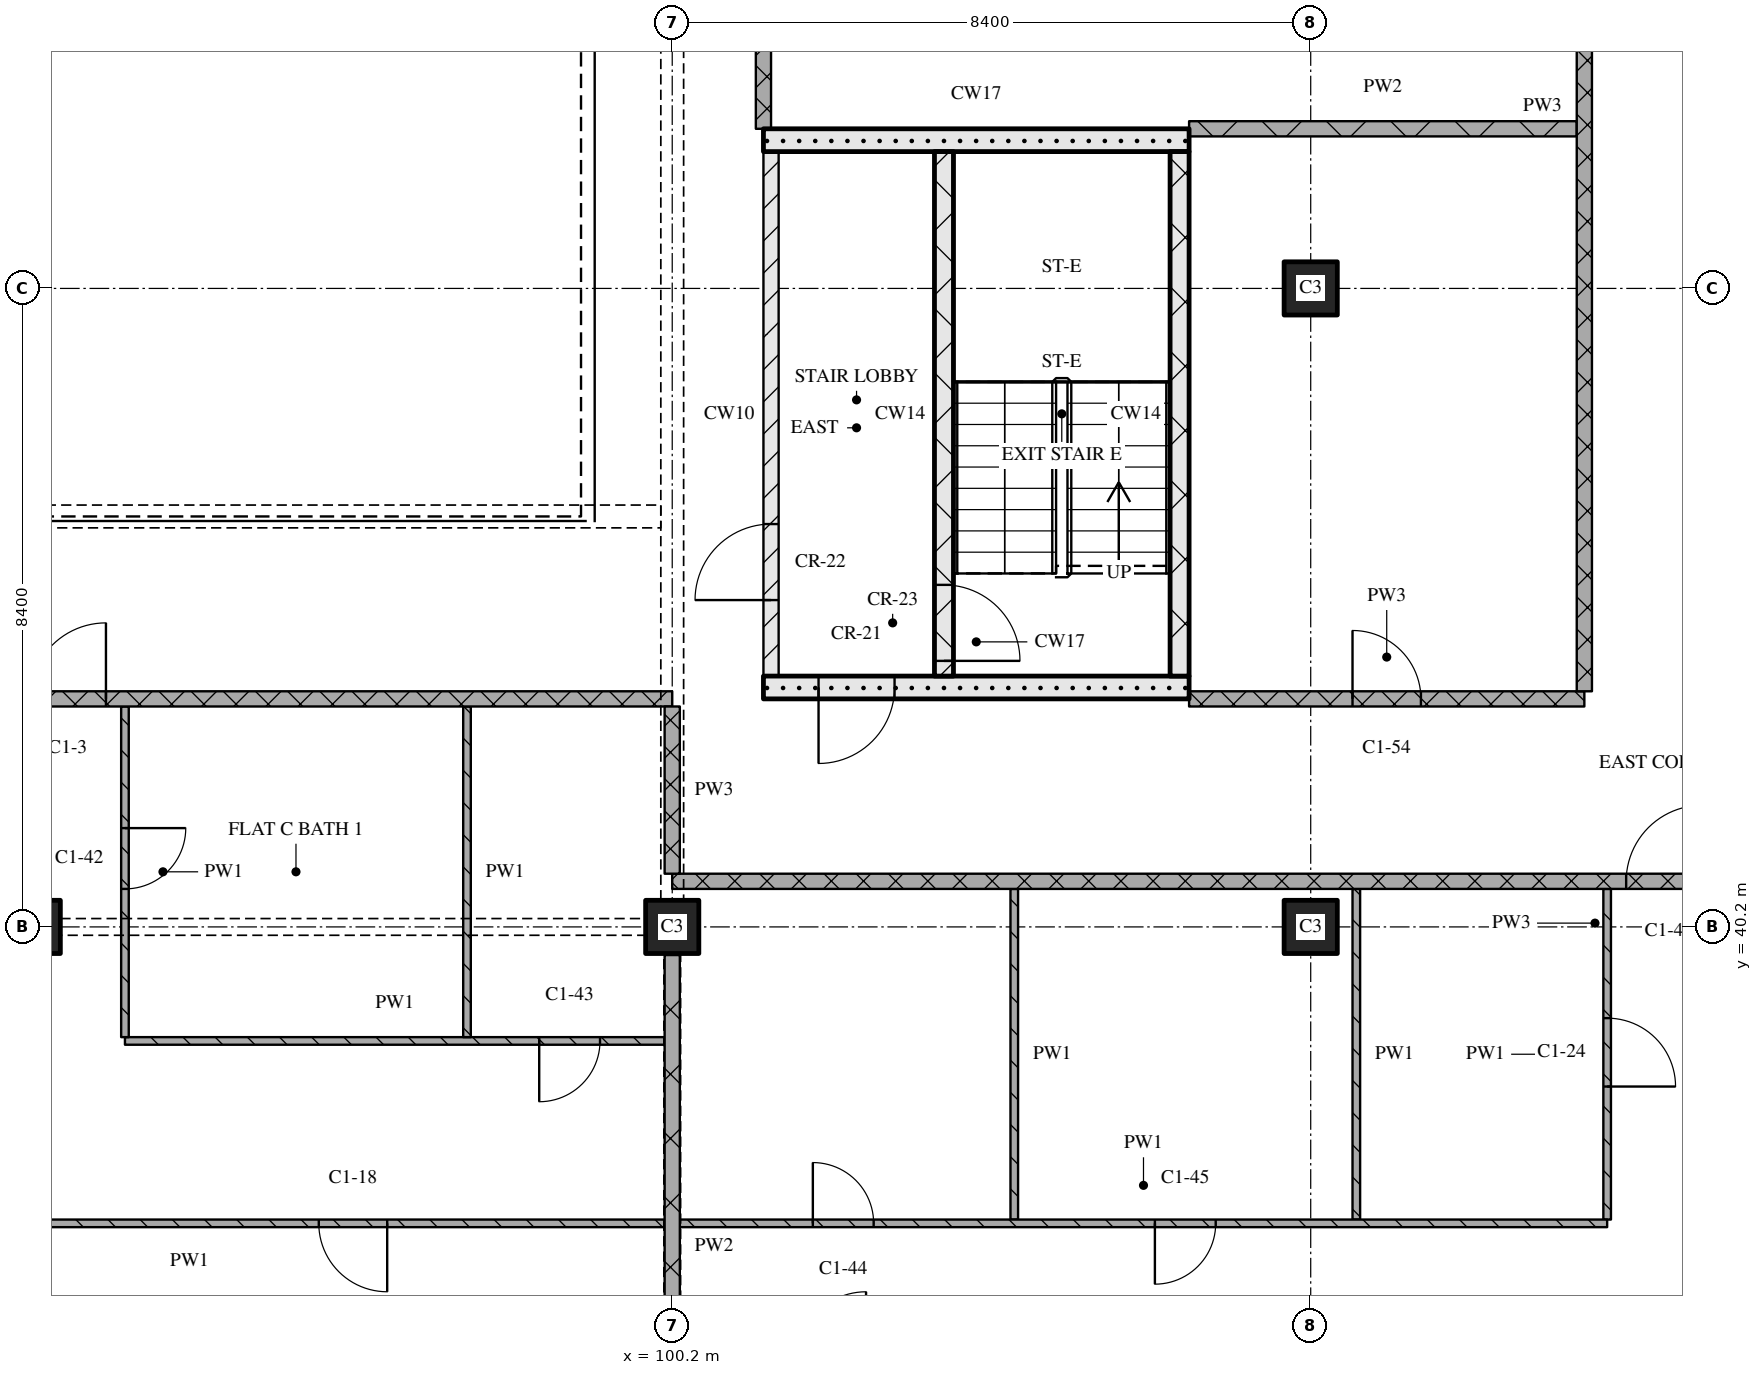
"""IFC4 building model, lengths in metres.
Left out: names, types, materials, properties, quantities, classifications, styles, units other than length and angle.
Written with IfcOpenShell. Run it as: python <this file> out.ifc"""

import sys

from ifc_helpers import new_model, si_unit, direction, frame, frame_2d, origin, origin_2d, place, context, subcontext, project, spatial, rectangle, extrude, element, fill, save


model = new_model("IFC4")
c1 = context("Model", 3, precision=1e-05, world=origin(), true_north=direction((0.0, 1.0)))
c2 = subcontext(c1, "Body", "Model", "MODEL_VIEW")
j1 = project(units=[si_unit("LENGTHUNIT", "METRE"), si_unit("PLANEANGLEUNIT", "RADIAN")], contexts=[c1])
p1 = place(None, origin())
s1 = spatial("IfcSite", under=j1, at=p1, CompositionType="ELEMENT")
p2 = place(p1, origin())
s2 = spatial("IfcBuilding", under=s1, at=p2, CompositionType="ELEMENT")
p3 = place(p2, frame((0.0, 0.0, 151.05)))
s3 = spatial("IfcBuildingStorey", under=s2, at=p3, CompositionType="ELEMENT", Elevation=151.05)
for number, where, z_axis, x_axis in (
    (1, (91.8, 40.2, 0.0), (0.0, 0.0, 1.0), (1.0, 0.0, 0.0)),
    (2, (100.2, 40.2, 0.0), (0.0, 0.0, 1.0), (1.0, 0.0, 0.0)),
    (3, (108.6, 40.2, 0.0), (0.0, 0.0, 1.0), (1.0, 0.0, 0.0)),
    (4, (108.6, 48.6, 0.0), (0.0, 0.0, 1.0), (1.0, 0.0, 0.0)),
):
    element("IfcColumn", number, at=place(p3, frame(where, z_axis=z_axis, x_axis=x_axis)), inside=s3, PredefinedType="COLUMN", context=c2, shape_type="SweptSolid", body=[
        extrude(rectangle(XDim=0.7, YDim=0.7, at=origin_2d()), origin(), (0.0, 0.0, 1.0), 3.6),
    ])
p4 = place(p3, frame((101.4, 43.35, 0.0), z_axis=(0.0, 0.0, 1.0), x_axis=(1.0, 0.0, 0.0)))
e5 = element("IfcWall", 5, at=p4, inside=s3, PredefinedType="SOLIDWALL", context=c2, shape_type="SweptSolid", body=[
    extrude(rectangle(XDim=5.6, YDim=0.3, at=frame_2d((2.8, 0.0))), origin(), (0.0, 0.0, 1.0), 3.32),
])
p5 = place(p4, frame((0.725, 0.0, 0.0)))
e6 = element("IfcOpeningElement", 6, at=p5, cuts=e5, PredefinedType="OPENING", context=c2, shape_type="SweptSolid", body=[
    extrude(rectangle(XDim=1.0, YDim=2.1, at=frame_2d((0.5, 1.05))), frame((0.0, 0.16, 0.0), z_axis=(0.0, -1.0, 0.0), x_axis=(1.0, 0.0, 0.0)), (0.0, 0.0, 1.0), 0.32),
])
p6 = place(p3, frame((101.5, 43.5, 0.0), z_axis=(0.0, 0.0, 1.0), x_axis=(0.0, 1.0, 0.0)))
e7 = element("IfcWall", 7, at=p6, inside=s3, PredefinedType="PARTITIONING", context=c2, shape_type="SweptSolid", body=[
    extrude(rectangle(XDim=6.9, YDim=0.2, at=frame_2d((3.45, 0.0))), origin(), (0.0, 0.0, 1.0), 3.32),
])
p7 = place(p6, frame((1.0, 0.0, 0.0)))
e8 = element("IfcOpeningElement", 8, at=p7, cuts=e7, PredefinedType="OPENING", context=c2, shape_type="SweptSolid", body=[
    extrude(rectangle(XDim=1.0, YDim=2.1, at=frame_2d((0.5, 1.05))), frame((0.0, 0.11, 0.0), z_axis=(0.0, -1.0, 0.0), x_axis=(1.0, 0.0, 0.0)), (0.0, 0.0, 1.0), 0.22),
])
p8 = place(p3, frame((103.775, 43.5, 0.0), z_axis=(0.0, 0.0, 1.0), x_axis=(0.0, 1.0, 0.0)))
e9 = element("IfcWall", 9, at=p8, inside=s3, PredefinedType="SOLIDWALL", context=c2, shape_type="SweptSolid", body=[
    extrude(rectangle(XDim=6.9, YDim=0.25, at=frame_2d((3.45, 0.0))), origin(), (0.0, 0.0, 1.0), 3.32),
])
p9 = place(p8, frame((0.2, 0.0, 0.0)))
e10 = element("IfcOpeningElement", 10, at=p9, cuts=e9, PredefinedType="OPENING", context=c2, shape_type="SweptSolid", body=[
    extrude(rectangle(XDim=1.0, YDim=2.1, at=frame_2d((0.5, 1.05))), frame((0.0, 0.135, 0.0), z_axis=(0.0, -1.0, 0.0), x_axis=(1.0, 0.0, 0.0)), (0.0, 0.0, 1.0), 0.27),
])
p10 = place(p3, frame((106.875, 43.5, 0.0), z_axis=(0.0, 0.0, 1.0), x_axis=(0.0, 1.0, 0.0)))
e11 = element("IfcWall", 11, at=p10, inside=s3, PredefinedType="SOLIDWALL", context=c2, shape_type="SweptSolid", body=[
    extrude(rectangle(XDim=6.9, YDim=0.25, at=frame_2d((3.45, 0.0))), origin(), (0.0, 0.0, 1.0), 3.32),
])
p11 = place(p3, frame((101.4, 50.55, 0.0), z_axis=(0.0, 0.0, 1.0), x_axis=(1.0, 0.0, 0.0)))
e12 = element("IfcWall", 12, at=p11, inside=s3, PredefinedType="SOLIDWALL", context=c2, shape_type="SweptSolid", body=[
    extrude(rectangle(XDim=5.6, YDim=0.3, at=frame_2d((2.8, 0.0))), origin(), (0.0, 0.0, 1.0), 3.32),
])
p12 = place(p3, frame((93.0, 38.7, 0.0), z_axis=(0.0, 0.0, 1.0), x_axis=(1.0, 0.0, 0.0)))
e13 = element("IfcWall", 13, at=p12, inside=s3, PredefinedType="PARTITIONING", context=c2, shape_type="SweptSolid", body=[
    extrude(rectangle(XDim=7.1, YDim=0.1, at=frame_2d((3.55, 0.0))), origin(), (0.0, 0.0, 1.0), 3.32),
])
p13 = place(p12, frame((5.45, 0.0, 0.0)))
e14 = element("IfcOpeningElement", 14, at=p13, cuts=e13, PredefinedType="OPENING", context=c2, shape_type="SweptSolid", body=[
    extrude(rectangle(XDim=0.8, YDim=2.1, at=frame_2d((0.4, 1.05))), frame((0.0, 0.06, 0.0), z_axis=(0.0, -1.0, 0.0), x_axis=(1.0, 0.0, 0.0)), (0.0, 0.0, 1.0), 0.12),
])
p14 = place(p3, frame((124.48, 40.8, 0.0), z_axis=(0.0, 0.0, 1.0), x_axis=(-1.0, 0.0, 0.0)))
e15 = element("IfcWall", 15, at=p14, inside=s3, PredefinedType="PARTITIONING", context=c2, shape_type="SweptSolid", body=[
    extrude(rectangle(XDim=24.28, YDim=0.2, at=frame_2d((12.14, 0.0))), origin(), (0.0, 0.0, 1.0), 3.32),
])
p15 = place(p14, frame((10.73, 0.0, 0.0)))
e16 = element("IfcOpeningElement", 16, at=p15, cuts=e15, PredefinedType="OPENING", context=c2, shape_type="SweptSolid", body=[
    extrude(rectangle(XDim=1.0, YDim=2.1, at=frame_2d((0.5, 1.05))), frame((0.0, 0.11, 0.0), z_axis=(0.0, -1.0, 0.0), x_axis=(1.0, 0.0, 0.0)), (0.0, 0.0, 1.0), 0.22),
])
p16 = place(p3, frame((100.2, 43.2, 0.0), z_axis=(0.0, 0.0, 1.0), x_axis=(-1.0, 0.0, 0.0)))
e17 = element("IfcWall", 17, at=p16, inside=s3, PredefinedType="PARTITIONING", context=c2, shape_type="SweptSolid", body=[
    extrude(rectangle(XDim=25.2, YDim=0.2, at=frame_2d((12.6, 0.0))), origin(), (0.0, 0.0, 1.0), 3.32),
])
p17 = place(p16, frame((7.45, 0.0, 0.0)))
e18 = element("IfcOpeningElement", 18, at=p17, cuts=e17, PredefinedType="OPENING", context=c2, shape_type="SweptSolid", body=[
    extrude(rectangle(XDim=1.0, YDim=2.1, at=frame_2d((0.5, 1.05))), frame((0.0, 0.11, 0.0), z_axis=(0.0, -1.0, 0.0), x_axis=(1.0, 0.0, 0.0)), (0.0, 0.0, 1.0), 0.22),
])
p18 = place(p16, frame((20.95, 0.0, 0.0)))
e19 = element("IfcOpeningElement", 19, at=p18, cuts=e17, PredefinedType="OPENING", context=c2, shape_type="SweptSolid", body=[
    extrude(rectangle(XDim=1.0, YDim=2.1, at=frame_2d((0.5, 1.05))), frame((0.0, 0.11, 0.0), z_axis=(0.0, -1.0, 0.0), x_axis=(1.0, 0.0, 0.0)), (0.0, 0.0, 1.0), 0.22),
])
p19 = place(p3, frame((107.0, 43.2, 0.0), z_axis=(0.0, 0.0, 1.0), x_axis=(1.0, 0.0, 0.0)))
e20 = element("IfcWall", 20, at=p19, inside=s3, PredefinedType="PARTITIONING", context=c2, shape_type="SweptSolid", body=[
    extrude(rectangle(XDim=5.2, YDim=0.2, at=frame_2d((2.6, 0.0))), origin(), (0.0, 0.0, 1.0), 3.32),
])
p20 = place(p19, frame((2.15, 0.0, 0.0)))
e21 = element("IfcOpeningElement", 21, at=p20, cuts=e20, PredefinedType="OPENING", context=c2, shape_type="SweptSolid", body=[
    extrude(rectangle(XDim=0.9, YDim=2.1, at=frame_2d((0.45, 1.05))), frame((0.0, 0.11, 0.0), z_axis=(0.0, -1.0, 0.0), x_axis=(1.0, 0.0, 0.0)), (0.0, 0.0, 1.0), 0.22),
])
p21 = place(p3, frame((107.0, 50.7, 0.0), z_axis=(0.0, 0.0, 1.0), x_axis=(1.0, 0.0, 0.0)))
e22 = element("IfcWall", 22, at=p21, inside=s3, PredefinedType="PARTITIONING", context=c2, shape_type="SweptSolid", body=[
    extrude(rectangle(XDim=5.1, YDim=0.2, at=frame_2d((2.55, 0.0))), origin(), (0.0, 0.0, 1.0), 3.32),
])
p22 = place(p3, frame((93.0, 43.1, 0.0), z_axis=(0.0, 0.0, 1.0), x_axis=(0.0, -1.0, 0.0)))
e23 = element("IfcWall", 23, at=p22, inside=s3, PredefinedType="PARTITIONING", context=c2, shape_type="SweptSolid", body=[
    extrude(rectangle(XDim=4.35, YDim=0.1, at=frame_2d((2.175, 0.0))), origin(), (0.0, 0.0, 1.0), 3.32),
])
p23 = place(p22, frame((1.6, 0.0, 0.0)))
e24 = element("IfcOpeningElement", 24, at=p23, cuts=e23, PredefinedType="OPENING", context=c2, shape_type="SweptSolid", body=[
    extrude(rectangle(XDim=0.8, YDim=2.1, at=frame_2d((0.4, 1.05))), frame((0.0, 0.06, 0.0), z_axis=(0.0, -1.0, 0.0), x_axis=(1.0, 0.0, 0.0)), (0.0, 0.0, 1.0), 0.12),
])
p24 = place(p3, frame((97.5, 43.1, 0.0), z_axis=(0.0, 0.0, 1.0), x_axis=(0.0, -1.0, 0.0)))
e25 = element("IfcWall", 25, at=p24, inside=s3, PredefinedType="PARTITIONING", context=c2, shape_type="SweptSolid", body=[
    extrude(rectangle(XDim=4.35, YDim=0.1, at=frame_2d((2.175, 0.0))), origin(), (0.0, 0.0, 1.0), 3.32),
])
p25 = place(p3, frame((100.2, 43.1, 0.0), z_axis=(0.0, 0.0, 1.0), x_axis=(0.0, -1.0, 0.0)))
e26 = element("IfcWall", 26, at=p25, inside=s3, PredefinedType="PARTITIONING", context=c2, shape_type="SweptSolid", body=[
    extrude(rectangle(XDim=2.2, YDim=0.2, at=frame_2d((1.1, 0.0))), origin(), (0.0, 0.0, 1.0), 2.43),
])
p26 = place(p3, frame((100.2, 39.83, 0.0), z_axis=(0.0, 0.0, 1.0), x_axis=(0.0, -1.0, 0.0)))
e27 = element("IfcWall", 27, at=p26, inside=s3, PredefinedType="PARTITIONING", context=c2, shape_type="SweptSolid", body=[
    extrude(rectangle(XDim=7.66, YDim=0.2, at=frame_2d((3.83, 0.0))), origin(), (0.0, 0.0, 1.0), 2.72),
])
p27 = place(p3, frame((101.4, 58.7, 0.0), z_axis=(0.0, 0.0, 1.0), x_axis=(0.0, -1.0, 0.0)))
e28 = element("IfcWall", 28, at=p27, inside=s3, PredefinedType="PARTITIONING", context=c2, shape_type="SweptSolid", body=[
    extrude(rectangle(XDim=8.0, YDim=0.2, at=frame_2d((4.0, 0.0))), origin(), (0.0, 0.0, 1.0), 3.32),
])
p28 = place(p27, frame((1.225, 0.0, 0.9)))
e29 = element("IfcOpeningElement", 29, at=p28, cuts=e28, PredefinedType="OPENING", context=c2, shape_type="SweptSolid", body=[
    extrude(rectangle(XDim=1.5, YDim=1.5, at=frame_2d((0.75, 0.75))), frame((0.0, 0.11, 0.0), z_axis=(0.0, -1.0, 0.0), x_axis=(1.0, 0.0, 0.0)), (0.0, 0.0, 1.0), 0.22),
])
for number, where, z_axis, x_axis in (
    (30, (104.7, 40.7, 0.0), (0.0, 0.0, 1.0), (0.0, -1.0, 0.0)),
    (31, (109.2, 40.7, 0.0), (0.0, 0.0, 1.0), (0.0, -1.0, 0.0)),
):
    element("IfcWall", number, at=place(p3, frame(where, z_axis=z_axis, x_axis=x_axis)), inside=s3, PredefinedType="PARTITIONING", context=c2, shape_type="SweptSolid", body=[
        extrude(rectangle(XDim=4.35, YDim=0.1, at=frame_2d((2.175, 0.0))), origin(), (0.0, 0.0, 1.0), 3.32),
    ])
p29 = place(p3, frame((112.2, 43.3, 0.0), z_axis=(0.0, 0.0, 1.0), x_axis=(0.0, 1.0, 0.0)))
e32 = element("IfcWall", 32, at=p29, inside=s3, PredefinedType="PARTITIONING", context=c2, shape_type="SweptSolid", body=[
    extrude(rectangle(XDim=15.4, YDim=0.2, at=frame_2d((7.7, 0.0))), origin(), (0.0, 0.0, 1.0), 3.32),
])
p30 = place(p29, frame((11.85, 0.0, 0.0)))
e33 = element("IfcOpeningElement", 33, at=p30, cuts=e32, PredefinedType="OPENING", context=c2, shape_type="SweptSolid", body=[
    extrude(rectangle(XDim=1.0, YDim=2.1, at=frame_2d((0.5, 1.05))), frame((0.0, 0.11, 0.0), z_axis=(0.0, -1.0, 0.0), x_axis=(1.0, 0.0, 0.0)), (0.0, 0.0, 1.0), 0.22),
])
p31 = place(p3, frame((112.5, 36.35, 0.0), z_axis=(0.0, 0.0, 1.0), x_axis=(0.0, 1.0, 0.0)))
e34 = element("IfcWall", 34, at=p31, inside=s3, PredefinedType="PARTITIONING", context=c2, shape_type="SweptSolid", body=[
    extrude(rectangle(XDim=4.35, YDim=0.1, at=frame_2d((2.175, 0.0))), origin(), (0.0, 0.0, 1.0), 3.32),
])
p32 = place(p31, frame((1.75, 0.0, 0.0)))
e35 = element("IfcOpeningElement", 35, at=p32, cuts=e34, PredefinedType="OPENING", context=c2, shape_type="SweptSolid", body=[
    extrude(rectangle(XDim=0.9, YDim=2.1, at=frame_2d((0.45, 1.05))), frame((0.0, 0.06, 0.0), z_axis=(0.0, -1.0, 0.0), x_axis=(1.0, 0.0, 0.0)), (0.0, 0.0, 1.0), 0.12),
])
p33 = place(p3, frame((100.1, 36.3, 0.0), z_axis=(0.0, 0.0, 1.0), x_axis=(-1.0, 0.0, 0.0)))
e36 = element("IfcWall", 36, at=p33, inside=s3, PredefinedType="PARTITIONING", context=c2, shape_type="SweptSolid", body=[
    extrude(rectangle(XDim=12.5, YDim=0.1, at=frame_2d((6.25, 0.0))), origin(), (0.0, 0.0, 1.0), 3.32),
])
p34 = place(p33, frame((3.65, 0.0, 0.0)))
e37 = element("IfcOpeningElement", 37, at=p34, cuts=e36, PredefinedType="OPENING", context=c2, shape_type="SweptSolid", body=[
    extrude(rectangle(XDim=0.9, YDim=2.1, at=frame_2d((0.45, 1.05))), frame((0.0, 0.06, 0.0), z_axis=(0.0, -1.0, 0.0), x_axis=(1.0, 0.0, 0.0)), (0.0, 0.0, 1.0), 0.12),
])
p35 = place(p33, frame((9.95, 0.0, 0.0)))
e38 = element("IfcOpeningElement", 38, at=p35, cuts=e36, PredefinedType="OPENING", context=c2, shape_type="SweptSolid", body=[
    extrude(rectangle(XDim=0.9, YDim=2.1, at=frame_2d((0.45, 1.05))), frame((0.0, 0.06, 0.0), z_axis=(0.0, -1.0, 0.0), x_axis=(1.0, 0.0, 0.0)), (0.0, 0.0, 1.0), 0.12),
])
p36 = place(p3, frame((100.3, 36.3, 0.0), z_axis=(0.0, 0.0, 1.0), x_axis=(1.0, 0.0, 0.0)))
e39 = element("IfcWall", 39, at=p36, inside=s3, PredefinedType="PARTITIONING", context=c2, shape_type="SweptSolid", body=[
    extrude(rectangle(XDim=12.2, YDim=0.1, at=frame_2d((6.1, 0.0))), origin(), (0.0, 0.0, 1.0), 3.32),
])
p37 = place(p36, frame((1.75, 0.0, 0.0)))
e40 = element("IfcOpeningElement", 40, at=p37, cuts=e39, PredefinedType="OPENING", context=c2, shape_type="SweptSolid", body=[
    extrude(rectangle(XDim=0.8, YDim=2.1, at=frame_2d((0.4, 1.05))), frame((0.0, 0.06, 0.0), z_axis=(0.0, -1.0, 0.0), x_axis=(1.0, 0.0, 0.0)), (0.0, 0.0, 1.0), 0.12),
])
p38 = place(p36, frame((6.25, 0.0, 0.0)))
e41 = element("IfcOpeningElement", 41, at=p38, cuts=e39, PredefinedType="OPENING", context=c2, shape_type="SweptSolid", body=[
    extrude(rectangle(XDim=0.8, YDim=2.1, at=frame_2d((0.4, 1.05))), frame((0.0, 0.06, 0.0), z_axis=(0.0, -1.0, 0.0), x_axis=(1.0, 0.0, 0.0)), (0.0, 0.0, 1.0), 0.12),
])
p39 = place(p5, origin())
e42 = element("IfcDoor", 42, at=p39, inside=s3, OperationType="SINGLE_SWING_RIGHT", PredefinedType="DOOR", context=c2, shape_type="SweptSolid", body=[
    extrude(rectangle(XDim=1.0, YDim=2.1, at=frame_2d((0.5, 1.05))), frame((0.0, 0.025, 0.0), z_axis=(0.0, -1.0, 0.0), x_axis=(1.0, 0.0, 0.0)), (0.0, 0.0, 1.0), 0.05),
])
fill(e6, e42)
p40 = place(p9, origin())
e43 = element("IfcDoor", 43, at=p40, inside=s3, OperationType="SINGLE_SWING_RIGHT", PredefinedType="DOOR", context=c2, shape_type="SweptSolid", body=[
    extrude(rectangle(XDim=1.0, YDim=2.1, at=frame_2d((0.5, 1.05))), frame((0.0, 0.025, 0.0), z_axis=(0.0, -1.0, 0.0), x_axis=(1.0, 0.0, 0.0)), (0.0, 0.0, 1.0), 0.05),
])
fill(e10, e43)
p41 = place(p7, origin())
e44 = element("IfcDoor", 44, at=p41, inside=s3, OperationType="SINGLE_SWING_LEFT", PredefinedType="DOOR", context=c2, shape_type="SweptSolid", body=[
    extrude(rectangle(XDim=1.0, YDim=2.1, at=frame_2d((0.5, 1.05))), frame((0.0, 0.025, 0.0), z_axis=(0.0, -1.0, 0.0), x_axis=(1.0, 0.0, 0.0)), (0.0, 0.0, 1.0), 0.05),
])
fill(e8, e44)
p42 = place(p13, origin())
e45 = element("IfcDoor", 45, at=p42, inside=s3, OperationType="SINGLE_SWING_RIGHT", PredefinedType="DOOR", context=c2, shape_type="SweptSolid", body=[
    extrude(rectangle(XDim=0.8, YDim=2.1, at=frame_2d((0.4, 1.05))), frame((0.0, 0.025, 0.0), z_axis=(0.0, -1.0, 0.0), x_axis=(1.0, 0.0, 0.0)), (0.0, 0.0, 1.0), 0.05),
])
fill(e14, e45)
p43 = place(p15, origin())
e46 = element("IfcDoor", 46, at=p43, inside=s3, OperationType="SINGLE_SWING_RIGHT", PredefinedType="DOOR", context=c2, shape_type="SweptSolid", body=[
    extrude(rectangle(XDim=1.0, YDim=2.1, at=frame_2d((0.5, 1.05))), frame((0.0, 0.025, 0.0), z_axis=(0.0, -1.0, 0.0), x_axis=(1.0, 0.0, 0.0)), (0.0, 0.0, 1.0), 0.05),
])
fill(e16, e46)
p44 = place(p17, origin())
e47 = element("IfcDoor", 47, at=p44, inside=s3, OperationType="SINGLE_SWING_RIGHT", PredefinedType="DOOR", context=c2, shape_type="SweptSolid", body=[
    extrude(rectangle(XDim=1.0, YDim=2.1, at=frame_2d((0.5, 1.05))), frame((0.0, 0.025, 0.0), z_axis=(0.0, -1.0, 0.0), x_axis=(1.0, 0.0, 0.0)), (0.0, 0.0, 1.0), 0.05),
])
fill(e18, e47)
p45 = place(p20, origin())
e48 = element("IfcDoor", 48, at=p45, inside=s3, OperationType="SINGLE_SWING_LEFT", PredefinedType="DOOR", context=c2, shape_type="SweptSolid", body=[
    extrude(rectangle(XDim=0.9, YDim=2.1, at=frame_2d((0.45, 1.05))), frame((0.0, 0.025, 0.0), z_axis=(0.0, -1.0, 0.0), x_axis=(1.0, 0.0, 0.0)), (0.0, 0.0, 1.0), 0.05),
])
fill(e21, e48)
p46 = place(p23, origin())
e49 = element("IfcDoor", 49, at=p46, inside=s3, OperationType="SINGLE_SWING_LEFT", PredefinedType="DOOR", context=c2, shape_type="SweptSolid", body=[
    extrude(rectangle(XDim=0.8, YDim=2.1, at=frame_2d((0.4, 1.05))), frame((0.0, 0.025, 0.0), z_axis=(0.0, -1.0, 0.0), x_axis=(1.0, 0.0, 0.0)), (0.0, 0.0, 1.0), 0.05),
])
fill(e24, e49)
p47 = place(p32, origin())
e50 = element("IfcDoor", 50, at=p47, inside=s3, OperationType="SINGLE_SWING_RIGHT", PredefinedType="DOOR", context=c2, shape_type="SweptSolid", body=[
    extrude(rectangle(XDim=0.9, YDim=2.1, at=frame_2d((0.45, 1.05))), frame((0.0, 0.025, 0.0), z_axis=(0.0, -1.0, 0.0), x_axis=(1.0, 0.0, 0.0)), (0.0, 0.0, 1.0), 0.05),
])
fill(e35, e50)
p48 = place(p34, origin())
e51 = element("IfcDoor", 51, at=p48, inside=s3, OperationType="SINGLE_SWING_LEFT", PredefinedType="DOOR", context=c2, shape_type="SweptSolid", body=[
    extrude(rectangle(XDim=0.9, YDim=2.1, at=frame_2d((0.45, 1.05))), frame((0.0, 0.025, 0.0), z_axis=(0.0, -1.0, 0.0), x_axis=(1.0, 0.0, 0.0)), (0.0, 0.0, 1.0), 0.05),
])
fill(e37, e51)
p49 = place(p37, origin())
e52 = element("IfcDoor", 52, at=p49, inside=s3, OperationType="SINGLE_SWING_LEFT", PredefinedType="DOOR", context=c2, shape_type="SweptSolid", body=[
    extrude(rectangle(XDim=0.8, YDim=2.1, at=frame_2d((0.4, 1.05))), frame((0.0, 0.025, 0.0), z_axis=(0.0, -1.0, 0.0), x_axis=(1.0, 0.0, 0.0)), (0.0, 0.0, 1.0), 0.05),
])
fill(e40, e52)
p50 = place(p38, origin())
e53 = element("IfcDoor", 53, at=p50, inside=s3, OperationType="SINGLE_SWING_RIGHT", PredefinedType="DOOR", context=c2, shape_type="SweptSolid", body=[
    extrude(rectangle(XDim=0.8, YDim=2.1, at=frame_2d((0.4, 1.05))), frame((0.0, 0.025, 0.0), z_axis=(0.0, -1.0, 0.0), x_axis=(1.0, 0.0, 0.0)), (0.0, 0.0, 1.0), 0.05),
])
fill(e41, e53)
save(model, sys.argv[1])
